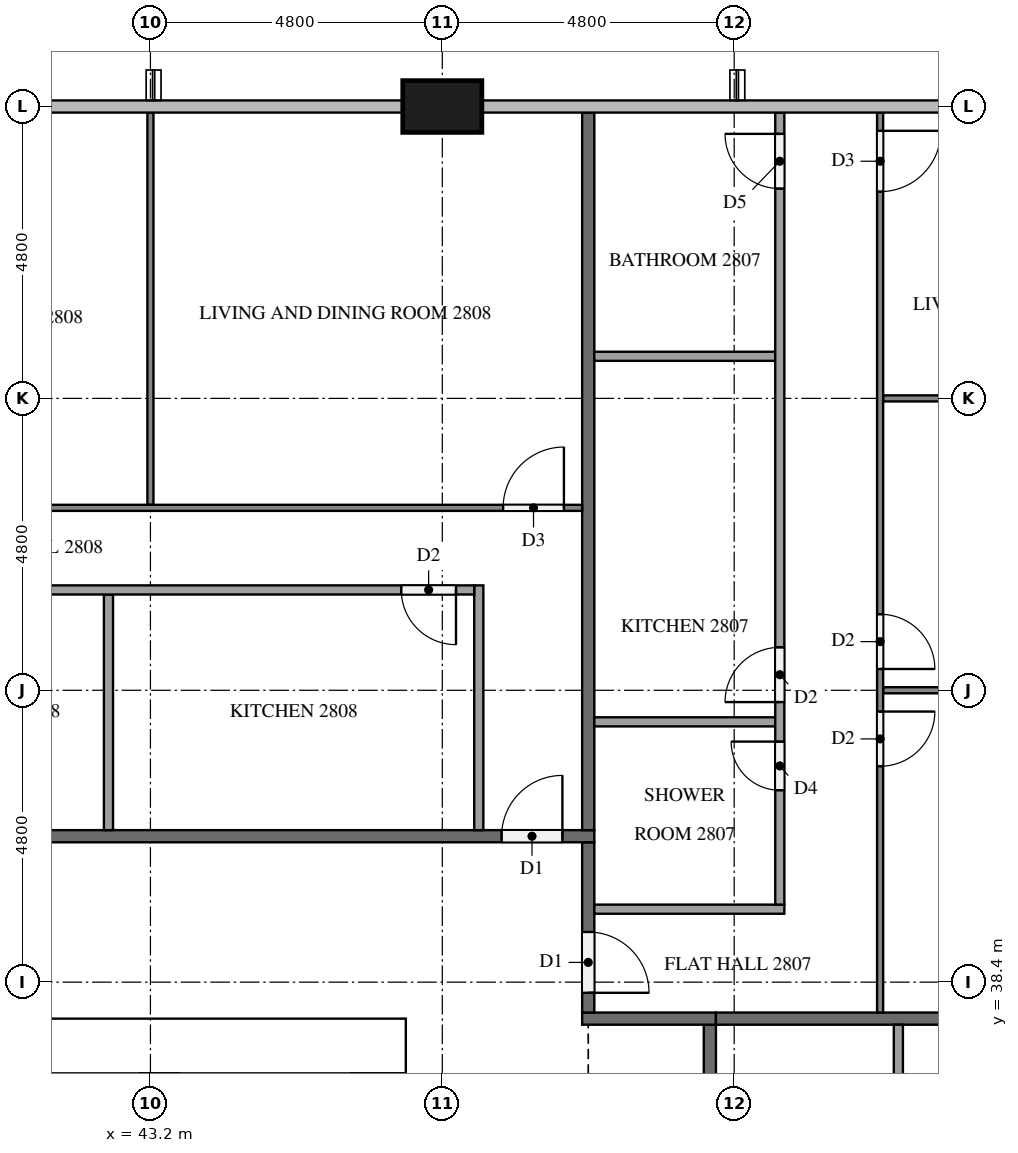
"""IFC4 building model, lengths in metres.
Left out: names, types, materials, properties, quantities, classifications, styles, units other than length and angle.
Written with IfcOpenShell. Run it as: python <this file> out.ifc"""

import sys

from ifc_helpers import new_model, si_unit, direction, frame, frame_2d, origin, origin_2d, place, context, subcontext, project, spatial, rectangle, extrude, element, fill, save


model = new_model("IFC4")
c1 = context("Model", 3, precision=1e-05, world=origin(), true_north=direction((0.0, 1.0)))
c2 = subcontext(c1, "Body", "Model", "MODEL_VIEW")
j1 = project(units=[si_unit("LENGTHUNIT", "METRE"), si_unit("PLANEANGLEUNIT", "RADIAN")], contexts=[c1])
p1 = place(None, origin())
s1 = spatial("IfcSite", under=j1, at=p1, CompositionType="ELEMENT")
p2 = place(p1, origin())
s2 = spatial("IfcBuilding", under=s1, at=p2, CompositionType="ELEMENT")
p3 = place(p2, frame((0.0, 0.0, 110.2)))
s3 = spatial("IfcBuildingStorey", under=s2, at=p3, CompositionType="ELEMENT", Elevation=110.2)
p4 = place(p3, frame((15.0, 37.35, 0.0), z_axis=(0.0, 0.0, 1.0), x_axis=(1.0, 0.0, 0.0)))
e1 = element("IfcWall", 1, at=p4, inside=s3, PredefinedType="SHEAR", context=c2, shape_type="SweptSolid", body=[
    extrude(rectangle(XDim=32.4, YDim=0.9, at=frame_2d((16.2, 0.0))), origin(), (0.0, 0.0, 1.0), 3.1),
])
p5 = place(p4, frame((15.3, 0.0, 0.0)))
e2 = element("IfcOpeningElement", 2, at=p5, cuts=e1, PredefinedType="OPENING", context=c2, shape_type="SweptSolid", body=[
    extrude(rectangle(XDim=1.8, YDim=2.1, at=frame_2d((0.9, 1.05))), frame((0.0, 0.46, 0.0), z_axis=(0.0, -1.0, 0.0), x_axis=(1.0, 0.0, 0.0)), (0.0, 0.0, 1.0), 0.92),
])
p6 = place(p4, frame((1.794, 0.0, 0.0)))
e3 = element("IfcOpeningElement", 3, at=p6, cuts=e1, PredefinedType="OPENING", context=c2, shape_type="SweptSolid", body=[
    extrude(rectangle(XDim=1.0, YDim=2.1, at=frame_2d((0.5, 1.05))), frame((0.0, 0.46, 0.0), z_axis=(0.0, -1.0, 0.0), x_axis=(1.0, 0.0, 0.0)), (0.0, 0.0, 1.0), 0.92),
])
p7 = place(p4, frame((5.331, 0.0, 0.0)))
e4 = element("IfcOpeningElement", 4, at=p7, cuts=e1, PredefinedType="OPENING", context=c2, shape_type="SweptSolid", body=[
    extrude(rectangle(XDim=1.0, YDim=2.1, at=frame_2d((0.5, 1.05))), frame((0.0, 0.46, 0.0), z_axis=(0.0, -1.0, 0.0), x_axis=(1.0, 0.0, 0.0)), (0.0, 0.0, 1.0), 0.92),
])
p8 = place(p3, frame((48.0, 52.8, 0.0), z_axis=(0.0, 0.0, 1.0), x_axis=(1.0, 0.0, 0.0)))
e5 = element("IfcColumn", 5, at=p8, inside=s3, PredefinedType="COLUMN", context=c2, shape_type="SweptSolid", body=[
    extrude(rectangle(XDim=1.3, YDim=0.85, at=origin_2d()), origin(), (0.0, 0.0, 1.0), 3.1),
])
p9 = place(p3, frame((52.4, 37.7, 0.0), z_axis=(0.0, 0.0, 1.0), x_axis=(0.0, -1.0, 0.0)))
e6 = element("IfcWall", 6, at=p9, inside=s3, PredefinedType="PARTITIONING", context=c2, shape_type="SweptSolid", body=[
    extrude(rectangle(XDim=22.6, YDim=0.2, at=frame_2d((11.3, 0.0))), origin(), (0.0, 0.0, 1.0), 3.1),
])
p10 = place(p9, frame((21.275, 0.0, 0.0)))
e7 = element("IfcOpeningElement", 7, at=p10, cuts=e6, PredefinedType="OPENING", context=c2, shape_type="SweptSolid", body=[
    extrude(rectangle(XDim=1.0, YDim=2.1, at=frame_2d((0.5, 1.05))), frame((0.0, 0.11, 0.0), z_axis=(0.0, -1.0, 0.0), x_axis=(1.0, 0.0, 0.0)), (0.0, 0.0, 1.0), 0.22),
])
p11 = place(p9, frame((9.875, 0.0, 0.0)))
e8 = element("IfcOpeningElement", 8, at=p11, cuts=e6, PredefinedType="OPENING", context=c2, shape_type="SweptSolid", body=[
    extrude(rectangle(XDim=1.0, YDim=2.1, at=frame_2d((0.5, 1.05))), frame((0.0, 0.11, 0.0), z_axis=(0.0, -1.0, 0.0), x_axis=(1.0, 0.0, 0.0)), (0.0, 0.0, 1.0), 0.22),
])
p12 = place(p3, frame((52.5, 37.8, 0.0), z_axis=(0.0, 0.0, 1.0), x_axis=(-1.0, 0.0, 0.0)))
e9 = element("IfcWall", 9, at=p12, inside=s3, PredefinedType="PARTITIONING", context=c2, shape_type="SweptSolid", body=[
    extrude(rectangle(XDim=2.2, YDim=0.2, at=frame_2d((1.1, 0.0))), origin(), (0.0, 0.0, 1.0), 3.1),
])
p13 = place(p3, frame((50.4, 40.7, 0.0), z_axis=(0.0, 0.0, 1.0), x_axis=(0.0, -1.0, 0.0)))
e10 = element("IfcWall", 10, at=p13, inside=s3, PredefinedType="PARTITIONING", context=c2, shape_type="SweptSolid", body=[
    extrude(rectangle(XDim=2.8, YDim=0.2, at=frame_2d((1.4, 0.0))), origin(), (0.0, 0.0, 1.0), 3.1),
])
p14 = place(p13, frame((1.475, 0.0, 0.0)))
e11 = element("IfcOpeningElement", 11, at=p14, cuts=e10, PredefinedType="OPENING", context=c2, shape_type="SweptSolid", body=[
    extrude(rectangle(XDim=1.0, YDim=2.1, at=frame_2d((0.5, 1.05))), frame((0.0, 0.11, 0.0), z_axis=(0.0, -1.0, 0.0), x_axis=(1.0, 0.0, 0.0)), (0.0, 0.0, 1.0), 0.22),
])
p15 = place(p3, frame((11.9, 40.8, 0.0), z_axis=(0.0, 0.0, 1.0), x_axis=(1.0, 0.0, 0.0)))
e12 = element("IfcWall", 12, at=p15, inside=s3, PredefinedType="PARTITIONING", context=c2, shape_type="SweptSolid", body=[
    extrude(rectangle(XDim=38.6, YDim=0.2, at=frame_2d((19.3, 0.0))), origin(), (0.0, 0.0, 1.0), 3.1),
])
p16 = place(p15, frame((37.075, 0.0, 0.0)))
e13 = element("IfcOpeningElement", 13, at=p16, cuts=e12, PredefinedType="OPENING", context=c2, shape_type="SweptSolid", body=[
    extrude(rectangle(XDim=1.0, YDim=2.1, at=frame_2d((0.5, 1.05))), frame((0.0, 0.11, 0.0), z_axis=(0.0, -1.0, 0.0), x_axis=(1.0, 0.0, 0.0)), (0.0, 0.0, 1.0), 0.22),
])
p17 = place(p15, frame((14.925, 0.0, 0.0)))
e14 = element("IfcOpeningElement", 14, at=p17, cuts=e12, PredefinedType="OPENING", context=c2, shape_type="SweptSolid", body=[
    extrude(rectangle(XDim=1.0, YDim=2.1, at=frame_2d((0.5, 1.05))), frame((0.0, 0.11, 0.0), z_axis=(0.0, -1.0, 0.0), x_axis=(1.0, 0.0, 0.0)), (0.0, 0.0, 1.0), 0.22),
])
p18 = place(p15, frame((0.525, 0.0, 0.0)))
e15 = element("IfcOpeningElement", 15, at=p18, cuts=e12, PredefinedType="OPENING", context=c2, shape_type="SweptSolid", body=[
    extrude(rectangle(XDim=1.0, YDim=2.1, at=frame_2d((0.5, 1.05))), frame((0.0, 0.11, 0.0), z_axis=(0.0, -1.0, 0.0), x_axis=(1.0, 0.0, 0.0)), (0.0, 0.0, 1.0), 0.22),
])
p19 = place(p3, frame((52.5, 37.8, 0.0), z_axis=(0.0, 0.0, 1.0), x_axis=(1.0, 0.0, 0.0)))
e16 = element("IfcWall", 16, at=p19, inside=s3, PredefinedType="PARTITIONING", context=c2, shape_type="SweptSolid", body=[
    extrude(rectangle(XDim=9.475, YDim=0.2, at=frame_2d((4.738, 0.0))), origin(), (0.0, 0.0, 1.0), 3.1),
])
p20 = place(p3, frame((50.4, 40.9, 0.0), z_axis=(0.0, 0.0, 1.0), x_axis=(0.0, 1.0, 0.0)))
e17 = element("IfcWall", 17, at=p20, inside=s3, PredefinedType="PARTITIONING", context=c2, shape_type="SweptSolid", body=[
    extrude(rectangle(XDim=11.8, YDim=0.2, at=frame_2d((5.9, 0.0))), origin(), (0.0, 0.0, 1.0), 3.1),
])
p21 = place(p3, frame((55.5, 28.275, 0.0), z_axis=(0.0, 0.0, 1.0), x_axis=(0.0, 1.0, 0.0)))
e18 = element("IfcWall", 18, at=p21, inside=s3, PredefinedType="PARTITIONING", context=c2, shape_type="SweptSolid", body=[
    extrude(rectangle(XDim=9.425, YDim=0.15, at=frame_2d((4.712, 0.0))), origin(), (0.0, 0.0, 1.0), 3.1),
])
p22 = place(p21, frame((4.43, 0.0, 0.0)))
e19 = element("IfcOpeningElement", 19, at=p22, cuts=e18, PredefinedType="OPENING", context=c2, shape_type="SweptSolid", body=[
    extrude(rectangle(XDim=0.9, YDim=2.1, at=frame_2d((0.45, 1.05))), frame((0.0, 0.085, 0.0), z_axis=(0.0, -1.0, 0.0), x_axis=(1.0, 0.0, 0.0)), (0.0, 0.0, 1.0), 0.17),
])
p23 = place(p21, frame((5.98, 0.0, 0.0)))
e20 = element("IfcOpeningElement", 20, at=p23, cuts=e18, PredefinedType="OPENING", context=c2, shape_type="SweptSolid", body=[
    extrude(rectangle(XDim=0.8, YDim=2.1, at=frame_2d((0.4, 1.05))), frame((0.0, 0.085, 0.0), z_axis=(0.0, -1.0, 0.0), x_axis=(1.0, 0.0, 0.0)), (0.0, 0.0, 1.0), 0.17),
])
p24 = place(p3, frame((55.25, 43.2, 0.0), z_axis=(0.0, 0.0, 1.0), x_axis=(1.0, 0.0, 0.0)))
e21 = element("IfcWall", 21, at=p24, inside=s3, PredefinedType="PARTITIONING", context=c2, shape_type="SweptSolid", body=[
    extrude(rectangle(XDim=7.05, YDim=0.1, at=frame_2d((3.525, 0.0))), origin(), (0.0, 0.0, 1.0), 3.1),
])
p25 = place(p3, frame((55.25, 48.0, 0.0), z_axis=(0.0, 0.0, 1.0), x_axis=(1.0, 0.0, 0.0)))
e22 = element("IfcWall", 22, at=p25, inside=s3, PredefinedType="PARTITIONING", context=c2, shape_type="SweptSolid", body=[
    extrude(rectangle(XDim=6.575, YDim=0.1, at=frame_2d((3.288, 0.0))), origin(), (0.0, 0.0, 1.0), 3.1),
])
p26 = place(p3, frame((55.2, 52.7, 0.0), z_axis=(0.0, 0.0, 1.0), x_axis=(0.0, -1.0, 0.0)))
e23 = element("IfcWall", 23, at=p26, inside=s3, PredefinedType="PARTITIONING", context=c2, shape_type="SweptSolid", body=[
    extrude(rectangle(XDim=14.8, YDim=0.1, at=frame_2d((7.4, 0.0))), origin(), (0.0, 0.0, 1.0), 3.1),
])
p27 = place(p26, frame((9.85, 0.0, 0.0)))
e24 = element("IfcOpeningElement", 24, at=p27, cuts=e23, PredefinedType="OPENING", context=c2, shape_type="SweptSolid", body=[
    extrude(rectangle(XDim=0.9, YDim=2.1, at=frame_2d((0.45, 1.05))), frame((0.0, 0.06, 0.0), z_axis=(0.0, -1.0, 0.0), x_axis=(1.0, 0.0, 0.0)), (0.0, 0.0, 1.0), 0.12),
])
p28 = place(p26, frame((8.25, 0.0, 0.0)))
e25 = element("IfcOpeningElement", 25, at=p28, cuts=e23, PredefinedType="OPENING", context=c2, shape_type="SweptSolid", body=[
    extrude(rectangle(XDim=0.9, YDim=2.1, at=frame_2d((0.45, 1.05))), frame((0.0, 0.06, 0.0), z_axis=(0.0, -1.0, 0.0), x_axis=(1.0, 0.0, 0.0)), (0.0, 0.0, 1.0), 0.12),
])
p29 = place(p26, frame((0.3, 0.0, 0.0)))
e26 = element("IfcOpeningElement", 26, at=p29, cuts=e23, PredefinedType="OPENING", context=c2, shape_type="SweptSolid", body=[
    extrude(rectangle(XDim=1.0, YDim=2.1, at=frame_2d((0.5, 1.05))), frame((0.0, 0.06, 0.0), z_axis=(0.0, -1.0, 0.0), x_axis=(1.0, 0.0, 0.0)), (0.0, 0.0, 1.0), 0.12),
])
for number, where, z_axis, x_axis in (
    (27, (50.5, 42.681, 0.0), (0.0, 0.0, 1.0), (1.0, 0.0, 0.0)),
    (28, (50.5, 48.692, 0.0), (0.0, 0.0, 1.0), (1.0, 0.0, 0.0)),
):
    element("IfcWall", number, at=place(p3, frame(where, z_axis=z_axis, x_axis=x_axis)), inside=s3, PredefinedType="PARTITIONING", context=c2, shape_type="SweptSolid", body=[
        extrude(rectangle(XDim=2.975, YDim=0.15, at=frame_2d((1.488, 0.0))), origin(), (0.0, 0.0, 1.0), 3.1),
    ])
p30 = place(p3, frame((50.5, 39.6, 0.0), z_axis=(0.0, 0.0, 1.0), x_axis=(1.0, 0.0, 0.0)))
e29 = element("IfcWall", 29, at=p30, inside=s3, PredefinedType="PARTITIONING", context=c2, shape_type="SweptSolid", body=[
    extrude(rectangle(XDim=3.125, YDim=0.15, at=frame_2d((1.562, 0.0))), origin(), (0.0, 0.0, 1.0), 3.1),
])
p31 = place(p3, frame((53.55, 39.675, 0.0), z_axis=(0.0, 0.0, 1.0), x_axis=(0.0, 1.0, 0.0)))
e30 = element("IfcWall", 30, at=p31, inside=s3, PredefinedType="PARTITIONING", context=c2, shape_type="SweptSolid", body=[
    extrude(rectangle(XDim=13.025, YDim=0.15, at=frame_2d((6.512, 0.0))), origin(), (0.0, 0.0, 1.0), 3.1),
])
p32 = place(p31, frame((1.881, 0.0, 0.0)))
e31 = element("IfcOpeningElement", 31, at=p32, cuts=e30, PredefinedType="OPENING", context=c2, shape_type="SweptSolid", body=[
    extrude(rectangle(XDim=0.8, YDim=2.1, at=frame_2d((0.4, 1.05))), frame((0.0, 0.085, 0.0), z_axis=(0.0, -1.0, 0.0), x_axis=(1.0, 0.0, 0.0)), (0.0, 0.0, 1.0), 0.17),
])
p33 = place(p31, frame((3.331, 0.0, 0.0)))
e32 = element("IfcOpeningElement", 32, at=p33, cuts=e30, PredefinedType="OPENING", context=c2, shape_type="SweptSolid", body=[
    extrude(rectangle(XDim=0.9, YDim=2.1, at=frame_2d((0.45, 1.05))), frame((0.0, 0.085, 0.0), z_axis=(0.0, -1.0, 0.0), x_axis=(1.0, 0.0, 0.0)), (0.0, 0.0, 1.0), 0.17),
])
p34 = place(p31, frame((11.775, 0.0, 0.0)))
e33 = element("IfcOpeningElement", 33, at=p34, cuts=e30, PredefinedType="OPENING", context=c2, shape_type="SweptSolid", body=[
    extrude(rectangle(XDim=0.9, YDim=2.1, at=frame_2d((0.45, 1.05))), frame((0.0, 0.085, 0.0), z_axis=(0.0, -1.0, 0.0), x_axis=(1.0, 0.0, 0.0)), (0.0, 0.0, 1.0), 0.17),
])
p35 = place(p3, frame((43.2, 46.25, 0.0), z_axis=(0.0, 0.0, 1.0), x_axis=(0.0, 1.0, 0.0)))
e34 = element("IfcWall", 34, at=p35, inside=s3, PredefinedType="PARTITIONING", context=c2, shape_type="SweptSolid", body=[
    extrude(rectangle(XDim=6.45, YDim=0.1, at=frame_2d((3.225, 0.0))), origin(), (0.0, 0.0, 1.0), 3.1),
])
p36 = place(p3, frame((38.5, 46.2, 0.0), z_axis=(0.0, 0.0, 1.0), x_axis=(1.0, 0.0, 0.0)))
e35 = element("IfcWall", 35, at=p36, inside=s3, PredefinedType="PARTITIONING", context=c2, shape_type="SweptSolid", body=[
    extrude(rectangle(XDim=11.8, YDim=0.1, at=frame_2d((5.9, 0.0))), origin(), (0.0, 0.0, 1.0), 3.1),
])
p37 = place(p36, frame((10.5, 0.0, 0.0)))
e36 = element("IfcOpeningElement", 36, at=p37, cuts=e35, PredefinedType="OPENING", context=c2, shape_type="SweptSolid", body=[
    extrude(rectangle(XDim=1.0, YDim=2.1, at=frame_2d((0.5, 1.05))), frame((0.0, 0.06, 0.0), z_axis=(0.0, -1.0, 0.0), x_axis=(1.0, 0.0, 0.0)), (0.0, 0.0, 1.0), 0.12),
])
p38 = place(p36, frame((0.3, 0.0, 0.0)))
e37 = element("IfcOpeningElement", 37, at=p38, cuts=e35, PredefinedType="OPENING", context=c2, shape_type="SweptSolid", body=[
    extrude(rectangle(XDim=0.9, YDim=2.1, at=frame_2d((0.45, 1.05))), frame((0.0, 0.06, 0.0), z_axis=(0.0, -1.0, 0.0), x_axis=(1.0, 0.0, 0.0)), (0.0, 0.0, 1.0), 0.12),
])
p39 = place(p3, frame((42.51, 40.9, 0.0), z_axis=(0.0, 0.0, 1.0), x_axis=(0.0, 1.0, 0.0)))
e38 = element("IfcWall", 38, at=p39, inside=s3, PredefinedType="PARTITIONING", context=c2, shape_type="SweptSolid", body=[
    extrude(rectangle(XDim=3.875, YDim=0.15, at=frame_2d((1.938, 0.0))), origin(), (0.0, 0.0, 1.0), 3.1),
])
p40 = place(p3, frame((48.6, 40.9, 0.0), z_axis=(0.0, 0.0, 1.0), x_axis=(0.0, 1.0, 0.0)))
e39 = element("IfcWall", 39, at=p40, inside=s3, PredefinedType="PARTITIONING", context=c2, shape_type="SweptSolid", body=[
    extrude(rectangle(XDim=4.025, YDim=0.15, at=frame_2d((2.013, 0.0))), origin(), (0.0, 0.0, 1.0), 3.1),
])
p41 = place(p3, frame((48.525, 44.85, 0.0), z_axis=(0.0, 0.0, 1.0), x_axis=(-1.0, 0.0, 0.0)))
e40 = element("IfcWall", 40, at=p41, inside=s3, PredefinedType="PARTITIONING", context=c2, shape_type="SweptSolid", body=[
    extrude(rectangle(XDim=10.025, YDim=0.15, at=frame_2d((5.012, 0.0))), origin(), (0.0, 0.0, 1.0), 3.1),
])
p42 = place(p41, frame((0.3, 0.0, 0.0)))
e41 = element("IfcOpeningElement", 41, at=p42, cuts=e40, PredefinedType="OPENING", context=c2, shape_type="SweptSolid", body=[
    extrude(rectangle(XDim=0.9, YDim=2.1, at=frame_2d((0.45, 1.05))), frame((0.0, 0.085, 0.0), z_axis=(0.0, -1.0, 0.0), x_axis=(1.0, 0.0, 0.0)), (0.0, 0.0, 1.0), 0.17),
])
p43 = place(p41, frame((8.875, 0.0, 0.0)))
e42 = element("IfcOpeningElement", 42, at=p43, cuts=e40, PredefinedType="OPENING", context=c2, shape_type="SweptSolid", body=[
    extrude(rectangle(XDim=0.8, YDim=2.1, at=frame_2d((0.4, 1.05))), frame((0.0, 0.085, 0.0), z_axis=(0.0, -1.0, 0.0), x_axis=(1.0, 0.0, 0.0)), (0.0, 0.0, 1.0), 0.17),
])
p44 = place(p14, origin())
e43 = element("IfcDoor", 43, at=p44, inside=s3, OperationType="SINGLE_SWING_RIGHT", PredefinedType="DOOR", context=c2, shape_type="SweptSolid", body=[
    extrude(rectangle(XDim=1.0, YDim=2.1, at=frame_2d((0.5, 1.05))), frame((0.0, 0.025, 0.0), z_axis=(0.0, -1.0, 0.0), x_axis=(1.0, 0.0, 0.0)), (0.0, 0.0, 1.0), 0.05),
])
fill(e11, e43)
p45 = place(p16, origin())
e44 = element("IfcDoor", 44, at=p45, inside=s3, OperationType="SINGLE_SWING_RIGHT", PredefinedType="DOOR", context=c2, shape_type="SweptSolid", body=[
    extrude(rectangle(XDim=1.0, YDim=2.1, at=frame_2d((0.5, 1.05))), frame((0.0, 0.025, 0.0), z_axis=(0.0, -1.0, 0.0), x_axis=(1.0, 0.0, 0.0)), (0.0, 0.0, 1.0), 0.05),
])
fill(e13, e44)
p46 = place(p27, origin())
e45 = element("IfcDoor", 45, at=p46, inside=s3, OperationType="SINGLE_SWING_LEFT", PredefinedType="DOOR", context=c2, shape_type="SweptSolid", body=[
    extrude(rectangle(XDim=0.9, YDim=2.1, at=frame_2d((0.45, 1.05))), frame((0.0, 0.025, 0.0), z_axis=(0.0, -1.0, 0.0), x_axis=(1.0, 0.0, 0.0)), (0.0, 0.0, 1.0), 0.05),
])
fill(e24, e45)
p47 = place(p28, origin())
e46 = element("IfcDoor", 46, at=p47, inside=s3, OperationType="SINGLE_SWING_RIGHT", PredefinedType="DOOR", context=c2, shape_type="SweptSolid", body=[
    extrude(rectangle(XDim=0.9, YDim=2.1, at=frame_2d((0.45, 1.05))), frame((0.0, 0.025, 0.0), z_axis=(0.0, -1.0, 0.0), x_axis=(1.0, 0.0, 0.0)), (0.0, 0.0, 1.0), 0.05),
])
fill(e25, e46)
p48 = place(p29, origin())
e47 = element("IfcDoor", 47, at=p48, inside=s3, OperationType="SINGLE_SWING_LEFT", PredefinedType="DOOR", context=c2, shape_type="SweptSolid", body=[
    extrude(rectangle(XDim=1.0, YDim=2.1, at=frame_2d((0.5, 1.05))), frame((0.0, 0.025, 0.0), z_axis=(0.0, -1.0, 0.0), x_axis=(1.0, 0.0, 0.0)), (0.0, 0.0, 1.0), 0.05),
])
fill(e26, e47)
p49 = place(p32, origin())
e48 = element("IfcDoor", 48, at=p49, inside=s3, OperationType="SINGLE_SWING_RIGHT", PredefinedType="DOOR", context=c2, shape_type="SweptSolid", body=[
    extrude(rectangle(XDim=0.8, YDim=2.1, at=frame_2d((0.4, 1.05))), frame((0.0, 0.025, 0.0), z_axis=(0.0, -1.0, 0.0), x_axis=(1.0, 0.0, 0.0)), (0.0, 0.0, 1.0), 0.05),
])
fill(e31, e48)
p50 = place(p33, origin())
e49 = element("IfcDoor", 49, at=p50, inside=s3, OperationType="SINGLE_SWING_LEFT", PredefinedType="DOOR", context=c2, shape_type="SweptSolid", body=[
    extrude(rectangle(XDim=0.9, YDim=2.1, at=frame_2d((0.45, 1.05))), frame((0.0, 0.025, 0.0), z_axis=(0.0, -1.0, 0.0), x_axis=(1.0, 0.0, 0.0)), (0.0, 0.0, 1.0), 0.05),
])
fill(e32, e49)
p51 = place(p34, origin())
e50 = element("IfcDoor", 50, at=p51, inside=s3, OperationType="SINGLE_SWING_RIGHT", PredefinedType="DOOR", context=c2, shape_type="SweptSolid", body=[
    extrude(rectangle(XDim=0.9, YDim=2.1, at=frame_2d((0.45, 1.05))), frame((0.0, 0.025, 0.0), z_axis=(0.0, -1.0, 0.0), x_axis=(1.0, 0.0, 0.0)), (0.0, 0.0, 1.0), 0.05),
])
fill(e33, e50)
p52 = place(p37, origin())
e51 = element("IfcDoor", 51, at=p52, inside=s3, OperationType="SINGLE_SWING_RIGHT", PredefinedType="DOOR", context=c2, shape_type="SweptSolid", body=[
    extrude(rectangle(XDim=1.0, YDim=2.1, at=frame_2d((0.5, 1.05))), frame((0.0, 0.025, 0.0), z_axis=(0.0, -1.0, 0.0), x_axis=(1.0, 0.0, 0.0)), (0.0, 0.0, 1.0), 0.05),
])
fill(e36, e51)
p53 = place(p42, origin())
e52 = element("IfcDoor", 52, at=p53, inside=s3, OperationType="SINGLE_SWING_LEFT", PredefinedType="DOOR", context=c2, shape_type="SweptSolid", body=[
    extrude(rectangle(XDim=0.9, YDim=2.1, at=frame_2d((0.45, 1.05))), frame((0.0, 0.025, 0.0), z_axis=(0.0, -1.0, 0.0), x_axis=(1.0, 0.0, 0.0)), (0.0, 0.0, 1.0), 0.05),
])
fill(e41, e52)
save(model, sys.argv[1])
